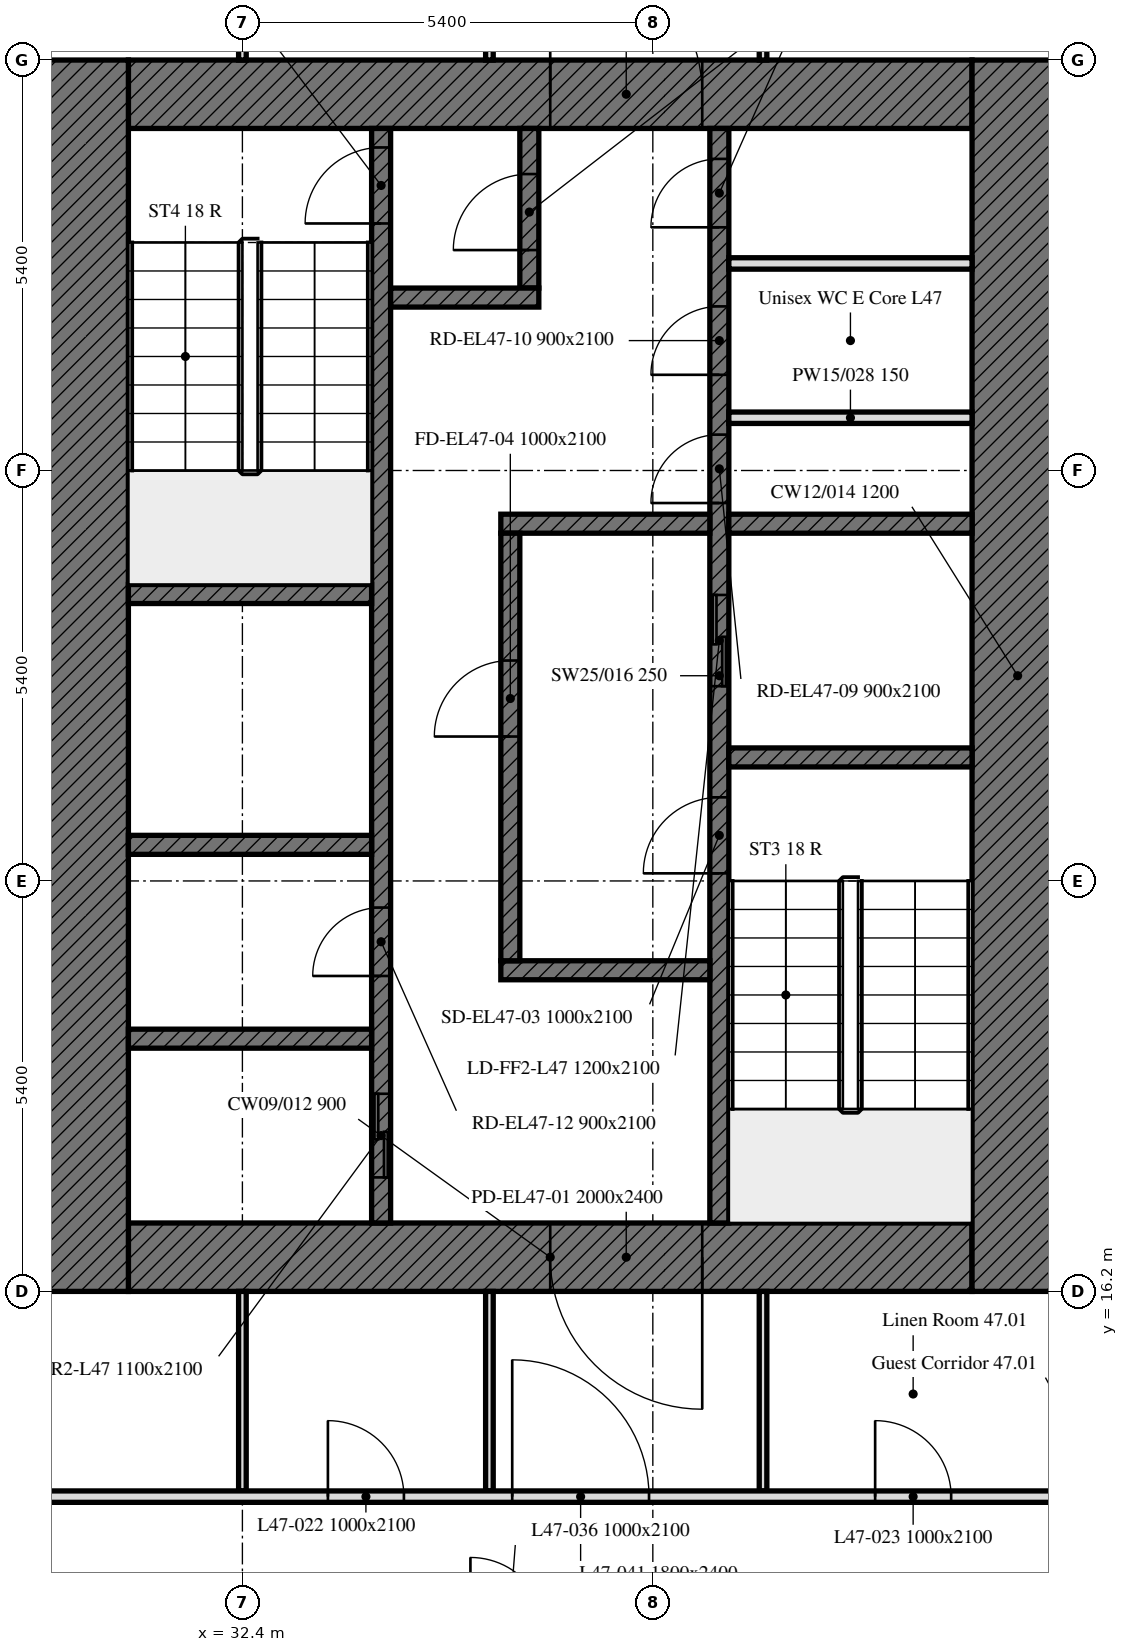
"""IFC4 building model, lengths in metres.
Left out: names, types, materials, properties, quantities, classifications, styles, units other than length and angle.
Written with IfcOpenShell. Run it as: python <this file> out.ifc"""

import sys

from ifc_helpers import new_model, si_unit, direction, frame, frame_2d, origin, place, context, subcontext, project, spatial, rectangle, extrude, element, fill, save


model = new_model("IFC4")
c1 = context("Model", 3, precision=1e-05, world=origin(), true_north=direction((0.0, 1.0)))
c2 = subcontext(c1, "Body", "Model", "MODEL_VIEW")
j1 = project(units=[si_unit("LENGTHUNIT", "METRE"), si_unit("PLANEANGLEUNIT", "RADIAN")], contexts=[c1])
p1 = place(None, origin())
s1 = spatial("IfcSite", under=j1, at=p1, CompositionType="ELEMENT")
p2 = place(p1, origin())
s2 = spatial("IfcBuilding", under=s1, at=p2, CompositionType="ELEMENT")
p3 = place(p2, frame((0.0, 0.0, 193.9)))
s3 = spatial("IfcBuildingStorey", under=s2, at=p3, CompositionType="ELEMENT", Elevation=193.9)
p4 = place(p3, frame((42.0, 16.65, 0.0), z_axis=(0.0, 0.0, 1.0), x_axis=(-1.0, 0.0, 0.0)))
e1 = element("IfcWall", 1, at=p4, inside=s3, PredefinedType="SOLIDWALL", context=c2, shape_type="SweptSolid", body=[
    extrude(rectangle(XDim=11.1, YDim=0.9, at=frame_2d((5.55, 0.0))), origin(), (0.0, 0.0, 1.0), 3.0),
])
p5 = place(p4, frame((3.55, 0.0, 0.0)))
e2 = element("IfcOpeningElement", 2, at=p5, cuts=e1, PredefinedType="OPENING", context=c2, shape_type="SweptSolid", body=[
    extrude(rectangle(XDim=2.0, YDim=2.4, at=frame_2d((1.0, 1.2))), frame((0.0, 0.45, 0.0), z_axis=(0.0, -1.0, 0.0), x_axis=(1.0, 0.0, 0.0)), (0.0, 0.0, 1.0), 0.9),
])
p6 = place(p3, frame((30.9, 31.95, 0.0), z_axis=(0.0, 0.0, 1.0), x_axis=(1.0, 0.0, 0.0)))
e3 = element("IfcWall", 3, at=p6, inside=s3, PredefinedType="SOLIDWALL", context=c2, shape_type="SweptSolid", body=[
    extrude(rectangle(XDim=11.1, YDim=0.9, at=frame_2d((5.55, 0.0))), origin(), (0.0, 0.0, 1.0), 3.0),
])
p7 = place(p6, frame((5.55, 0.0, 0.0)))
e4 = element("IfcOpeningElement", 4, at=p7, cuts=e3, PredefinedType="OPENING", context=c2, shape_type="SweptSolid", body=[
    extrude(rectangle(XDim=2.0, YDim=2.4, at=frame_2d((1.0, 1.2))), frame((0.0, 0.45, 0.0), z_axis=(0.0, -1.0, 0.0), x_axis=(1.0, 0.0, 0.0)), (0.0, 0.0, 1.0), 0.9),
])
for number, where, z_axis, x_axis in (
    (5, (42.6, 32.4, 0.0), (0.0, 0.0, 1.0), (0.0, -1.0, 0.0)),
    (6, (30.3, 16.2, 0.0), (0.0, 0.0, 1.0), (0.0, 1.0, 0.0)),
):
    element("IfcWall", number, at=place(p3, frame(where, z_axis=z_axis, x_axis=x_axis)), inside=s3, PredefinedType="SOLIDWALL", context=c2, shape_type="SweptSolid", body=[
        extrude(rectangle(XDim=16.2, YDim=1.2, at=frame_2d((8.1, 0.0))), origin(), (0.0, 0.0, 1.0), 3.0),
    ])
p8 = place(p3, frame((38.675, 17.1, 0.0), z_axis=(0.0, 0.0, 1.0), x_axis=(0.0, 1.0, 0.0)))
e7 = element("IfcWall", 7, at=p8, inside=s3, PredefinedType="SOLIDWALL", context=c2, shape_type="SweptSolid", body=[
    extrude(rectangle(XDim=14.4, YDim=0.25, at=frame_2d((7.2, 0.0))), origin(), (0.0, 0.0, 1.0), 3.0),
])
p9 = place(p8, frame((4.6, 0.0, 0.0)))
e8 = element("IfcOpeningElement", 8, at=p9, cuts=e7, PredefinedType="OPENING", context=c2, shape_type="SweptSolid", body=[
    extrude(rectangle(XDim=1.0, YDim=2.1, at=frame_2d((0.5, 1.05))), frame((0.0, 0.125, 0.0), z_axis=(0.0, -1.0, 0.0), x_axis=(1.0, 0.0, 0.0)), (0.0, 0.0, 1.0), 0.25),
])
p10 = place(p8, frame((7.062, 0.0, 0.0)))
e9 = element("IfcOpeningElement", 9, at=p10, cuts=e7, PredefinedType="OPENING", context=c2, shape_type="SweptSolid", body=[
    extrude(rectangle(XDim=1.2, YDim=2.1, at=frame_2d((0.6, 1.05))), frame((0.0, 0.125, 0.0), z_axis=(0.0, -1.0, 0.0), x_axis=(1.0, 0.0, 0.0)), (0.0, 0.0, 1.0), 0.25),
])
p11 = place(p8, frame((9.472, 0.0, 0.0)))
e10 = element("IfcOpeningElement", 10, at=p11, cuts=e7, PredefinedType="OPENING", context=c2, shape_type="SweptSolid", body=[
    extrude(rectangle(XDim=0.9, YDim=2.1, at=frame_2d((0.45, 1.05))), frame((0.0, 0.125, 0.0), z_axis=(0.0, -1.0, 0.0), x_axis=(1.0, 0.0, 0.0)), (0.0, 0.0, 1.0), 0.25),
])
p12 = place(p8, frame((11.159, 0.0, 0.0)))
e11 = element("IfcOpeningElement", 11, at=p12, cuts=e7, PredefinedType="OPENING", context=c2, shape_type="SweptSolid", body=[
    extrude(rectangle(XDim=0.9, YDim=2.1, at=frame_2d((0.45, 1.05))), frame((0.0, 0.125, 0.0), z_axis=(0.0, -1.0, 0.0), x_axis=(1.0, 0.0, 0.0)), (0.0, 0.0, 1.0), 0.25),
])
p13 = place(p8, frame((13.1, 0.0, 0.0)))
e12 = element("IfcOpeningElement", 12, at=p13, cuts=e7, PredefinedType="OPENING", context=c2, shape_type="SweptSolid", body=[
    extrude(rectangle(XDim=0.9, YDim=2.1, at=frame_2d((0.45, 1.05))), frame((0.0, 0.125, 0.0), z_axis=(0.0, -1.0, 0.0), x_axis=(1.0, 0.0, 0.0)), (0.0, 0.0, 1.0), 0.25),
])
p14 = place(p3, frame((34.225, 17.1, 0.0), z_axis=(0.0, 0.0, 1.0), x_axis=(0.0, 1.0, 0.0)))
e13 = element("IfcWall", 13, at=p14, inside=s3, PredefinedType="SOLIDWALL", context=c2, shape_type="SweptSolid", body=[
    extrude(rectangle(XDim=14.4, YDim=0.25, at=frame_2d((7.2, 0.0))), origin(), (0.0, 0.0, 1.0), 3.0),
])
p15 = place(p14, frame((13.15, 0.0, 0.0)))
e14 = element("IfcOpeningElement", 14, at=p15, cuts=e13, PredefinedType="OPENING", context=c2, shape_type="SweptSolid", body=[
    extrude(rectangle(XDim=1.0, YDim=2.1, at=frame_2d((0.5, 1.05))), frame((0.0, 0.125, 0.0), z_axis=(0.0, -1.0, 0.0), x_axis=(1.0, 0.0, 0.0)), (0.0, 0.0, 1.0), 0.25),
])
p16 = place(p14, frame((0.6, 0.0, 0.0)))
e15 = element("IfcOpeningElement", 15, at=p16, cuts=e13, PredefinedType="OPENING", context=c2, shape_type="SweptSolid", body=[
    extrude(rectangle(XDim=1.1, YDim=2.1, at=frame_2d((0.55, 1.05))), frame((0.0, 0.125, 0.0), z_axis=(0.0, -1.0, 0.0), x_axis=(1.0, 0.0, 0.0)), (0.0, 0.0, 1.0), 0.25),
])
p17 = place(p14, frame((3.25, 0.0, 0.0)))
e16 = element("IfcOpeningElement", 16, at=p17, cuts=e13, PredefinedType="OPENING", context=c2, shape_type="SweptSolid", body=[
    extrude(rectangle(XDim=0.9, YDim=2.1, at=frame_2d((0.45, 1.05))), frame((0.0, 0.125, 0.0), z_axis=(0.0, -1.0, 0.0), x_axis=(1.0, 0.0, 0.0)), (0.0, 0.0, 1.0), 0.25),
])
p18 = place(p3, frame((38.8, 23.225, 0.0), z_axis=(0.0, 0.0, 1.0), x_axis=(1.0, 0.0, 0.0)))
e17 = element("IfcWall", 17, at=p18, inside=s3, PredefinedType="SOLIDWALL", context=c2, shape_type="SweptSolid", body=[
    extrude(rectangle(XDim=3.2, YDim=0.25, at=frame_2d((1.6, 0.0))), origin(), (0.0, 0.0, 1.0), 3.0),
])
for number, where, z_axis, x_axis in (
    (18, (30.9, 25.375, 0.0), (0.0, 0.0, 1.0), (1.0, 0.0, 0.0)),
    (19, (30.9, 22.075, 0.0), (0.0, 0.0, 1.0), (1.0, 0.0, 0.0)),
):
    element("IfcWall", number, at=place(p3, frame(where, z_axis=z_axis, x_axis=x_axis)), inside=s3, PredefinedType="SOLIDWALL", context=c2, shape_type="SweptSolid", body=[
        extrude(rectangle(XDim=3.2, YDim=0.25, at=frame_2d((1.6, 0.0))), origin(), (0.0, 0.0, 1.0), 3.0),
    ])
p19 = place(p3, frame((38.8, 26.3, 0.0), z_axis=(0.0, 0.0, 1.0), x_axis=(1.0, 0.0, 0.0)))
e20 = element("IfcWall", 20, at=p19, inside=s3, PredefinedType="SOLIDWALL", context=c2, shape_type="SweptSolid", body=[
    extrude(rectangle(XDim=3.2, YDim=0.25, at=frame_2d((1.6, 0.0))), origin(), (0.0, 0.0, 1.0), 3.0),
])
for number, where, z_axis, x_axis in (
    (21, (35.8, 26.3, 0.0), (0.0, 0.0, 1.0), (1.0, 0.0, 0.0)),
    (22, (35.8, 20.425, 0.0), (0.0, 0.0, 1.0), (1.0, 0.0, 0.0)),
):
    element("IfcWall", number, at=place(p3, frame(where, z_axis=z_axis, x_axis=x_axis)), inside=s3, PredefinedType="SOLIDWALL", context=c2, shape_type="SweptSolid", body=[
        extrude(rectangle(XDim=2.75, YDim=0.25, at=frame_2d((1.375, 0.0))), origin(), (0.0, 0.0, 1.0), 3.0),
    ])
p20 = place(p3, frame((36.175, 29.4, 0.0), z_axis=(0.0, 0.0, 1.0), x_axis=(0.0, 1.0, 0.0)))
e23 = element("IfcWall", 23, at=p20, inside=s3, PredefinedType="SOLIDWALL", context=c2, shape_type="SweptSolid", body=[
    extrude(rectangle(XDim=2.1, YDim=0.25, at=frame_2d((1.05, 0.0))), origin(), (0.0, 0.0, 1.0), 3.0),
])
p21 = place(p20, frame((0.5, 0.0, 0.0)))
e24 = element("IfcOpeningElement", 24, at=p21, cuts=e23, PredefinedType="OPENING", context=c2, shape_type="SweptSolid", body=[
    extrude(rectangle(XDim=1.0, YDim=2.1, at=frame_2d((0.5, 1.05))), frame((0.0, 0.125, 0.0), z_axis=(0.0, -1.0, 0.0), x_axis=(1.0, 0.0, 0.0)), (0.0, 0.0, 1.0), 0.25),
])
p22 = place(p3, frame((34.35, 29.275, 0.0), z_axis=(0.0, 0.0, 1.0), x_axis=(1.0, 0.0, 0.0)))
e25 = element("IfcWall", 25, at=p22, inside=s3, PredefinedType="SOLIDWALL", context=c2, shape_type="SweptSolid", body=[
    extrude(rectangle(XDim=1.95, YDim=0.25, at=frame_2d((0.975, 0.0))), origin(), (0.0, 0.0, 1.0), 3.0),
])
p23 = place(p3, frame((35.925, 20.55, 0.0), z_axis=(0.0, 0.0, 1.0), x_axis=(0.0, 1.0, 0.0)))
e26 = element("IfcWall", 26, at=p23, inside=s3, PredefinedType="SOLIDWALL", context=c2, shape_type="SweptSolid", body=[
    extrude(rectangle(XDim=5.625, YDim=0.25, at=frame_2d((2.812, 0.0))), origin(), (0.0, 0.0, 1.0), 3.0),
])
p24 = place(p23, frame((2.95, 0.0, 0.0)))
e27 = element("IfcOpeningElement", 27, at=p24, cuts=e26, PredefinedType="OPENING", context=c2, shape_type="SweptSolid", body=[
    extrude(rectangle(XDim=1.0, YDim=2.1, at=frame_2d((0.5, 1.05))), frame((0.0, 0.125, 0.0), z_axis=(0.0, -1.0, 0.0), x_axis=(1.0, 0.0, 0.0)), (0.0, 0.0, 1.0), 0.25),
])
p25 = place(p3, frame((30.9, 19.525, 0.0), z_axis=(0.0, 0.0, 1.0), x_axis=(1.0, 0.0, 0.0)))
e28 = element("IfcWall", 28, at=p25, inside=s3, PredefinedType="SOLIDWALL", context=c2, shape_type="SweptSolid", body=[
    extrude(rectangle(XDim=3.2, YDim=0.25, at=frame_2d((1.6, 0.0))), origin(), (0.0, 0.0, 1.0), 3.0),
])
for number, where, z_axis, x_axis in (
    (29, (38.8, 27.694, 0.0), (0.0, 0.0, 1.0), (1.0, 0.0, 0.0)),
    (30, (38.8, 29.724, 0.0), (0.0, 0.0, 1.0), (1.0, 0.0, 0.0)),
):
    element("IfcWall", number, at=place(p3, frame(where, z_axis=z_axis, x_axis=x_axis)), inside=s3, PredefinedType="PARTITIONING", context=c2, shape_type="SweptSolid", body=[
        extrude(rectangle(XDim=3.2, YDim=0.15, at=frame_2d((1.6, 0.0))), origin(), (0.0, 0.0, 1.0), 3.0),
    ])
p26 = place(p3, frame((32.4, 32.4, 0.0), z_axis=(0.0, 0.0, 1.0), x_axis=(0.0, 1.0, 0.0)))
e31 = element("IfcWall", 31, at=p26, inside=s3, PredefinedType="PARTITIONING", context=c2, shape_type="SweptSolid", body=[
    extrude(rectangle(XDim=4.98, YDim=0.1, at=frame_2d((2.49, 0.0))), origin(), (0.0, 0.0, 1.0), 2.4),
])
for number, where, z_axis, x_axis in (
    (32, (35.65, 39.525, 0.0), (0.0, 0.0, 1.0), (0.0, -1.0, 0.0)),
    (33, (39.25, 32.4, 0.0), (0.0, 0.0, 1.0), (0.0, 1.0, 0.0)),
):
    element("IfcWall", number, at=place(p3, frame(where, z_axis=z_axis, x_axis=x_axis)), inside=s3, PredefinedType="PARTITIONING", context=c2, shape_type="SweptSolid", body=[
        extrude(rectangle(XDim=7.125, YDim=0.1, at=frame_2d((3.562, 0.0))), origin(), (0.0, 0.0, 1.0), 2.4),
    ])
for number, where, z_axis, x_axis in (
    (34, (32.4, 13.575, 0.0), (0.0, 0.0, 1.0), (0.0, 1.0, 0.0)),
    (35, (35.65, 16.2, 0.0), (0.0, 0.0, 1.0), (0.0, -1.0, 0.0)),
    (36, (39.25, 13.575, 0.0), (0.0, 0.0, 1.0), (0.0, 1.0, 0.0)),
):
    element("IfcWall", number, at=place(p3, frame(where, z_axis=z_axis, x_axis=x_axis)), inside=s3, PredefinedType="PARTITIONING", context=c2, shape_type="SweptSolid", body=[
        extrude(rectangle(XDim=2.625, YDim=0.1, at=frame_2d((1.312, 0.0))), origin(), (0.0, 0.0, 1.0), 3.0),
    ])
p27 = place(p3, frame((9.45, 13.5, 0.0), z_axis=(0.0, 0.0, 1.0), x_axis=(1.0, 0.0, 0.0)))
e37 = element("IfcWall", 37, at=p27, inside=s3, PredefinedType="PARTITIONING", context=c2, shape_type="SweptSolid", body=[
    extrude(rectangle(XDim=33.675, YDim=0.15, at=frame_2d((16.837, 0.0))), origin(), (0.0, 0.0, 1.0), 3.0),
])
p28 = place(p27, frame((8.95, 0.0, 0.0)))
e38 = element("IfcOpeningElement", 38, at=p28, cuts=e37, PredefinedType="OPENING", context=c2, shape_type="SweptSolid", body=[
    extrude(rectangle(XDim=1.0, YDim=2.1, at=frame_2d((0.5, 1.05))), frame((0.0, 0.075, 0.0), z_axis=(0.0, -1.0, 0.0), x_axis=(1.0, 0.0, 0.0)), (0.0, 0.0, 1.0), 0.15),
])
p29 = place(p27, frame((15.517, 0.0, 0.0)))
e39 = element("IfcOpeningElement", 39, at=p29, cuts=e37, PredefinedType="OPENING", context=c2, shape_type="SweptSolid", body=[
    extrude(rectangle(XDim=1.0, YDim=2.1, at=frame_2d((0.5, 1.05))), frame((0.0, 0.075, 0.0), z_axis=(0.0, -1.0, 0.0), x_axis=(1.0, 0.0, 0.0)), (0.0, 0.0, 1.0), 0.15),
])
p30 = place(p27, frame((24.075, 0.0, 0.0)))
e40 = element("IfcOpeningElement", 40, at=p30, cuts=e37, PredefinedType="OPENING", context=c2, shape_type="SweptSolid", body=[
    extrude(rectangle(XDim=1.0, YDim=2.1, at=frame_2d((0.5, 1.05))), frame((0.0, 0.075, 0.0), z_axis=(0.0, -1.0, 0.0), x_axis=(1.0, 0.0, 0.0)), (0.0, 0.0, 1.0), 0.15),
])
p31 = place(p27, frame((31.275, 0.0, 0.0)))
e41 = element("IfcOpeningElement", 41, at=p31, cuts=e37, PredefinedType="OPENING", context=c2, shape_type="SweptSolid", body=[
    extrude(rectangle(XDim=1.0, YDim=2.1, at=frame_2d((0.5, 1.05))), frame((0.0, 0.075, 0.0), z_axis=(0.0, -1.0, 0.0), x_axis=(1.0, 0.0, 0.0)), (0.0, 0.0, 1.0), 0.15),
])
p32 = place(p27, frame((4.625, 0.0, 0.0)))
e42 = element("IfcOpeningElement", 42, at=p32, cuts=e37, PredefinedType="OPENING", context=c2, shape_type="SweptSolid", body=[
    extrude(rectangle(XDim=1.0, YDim=2.1, at=frame_2d((0.5, 1.05))), frame((0.0, 0.075, 0.0), z_axis=(0.0, -1.0, 0.0), x_axis=(1.0, 0.0, 0.0)), (0.0, 0.0, 1.0), 0.15),
])
p33 = place(p27, frame((1.4, 0.0, 0.0)))
e43 = element("IfcOpeningElement", 43, at=p33, cuts=e37, PredefinedType="OPENING", context=c2, shape_type="SweptSolid", body=[
    extrude(rectangle(XDim=1.8, YDim=2.4, at=frame_2d((0.9, 1.2))), frame((0.0, 0.075, 0.0), z_axis=(0.0, -1.0, 0.0), x_axis=(1.0, 0.0, 0.0)), (0.0, 0.0, 1.0), 0.15),
])
p34 = place(p27, frame((26.5, 0.0, 0.0)))
e44 = element("IfcOpeningElement", 44, at=p34, cuts=e37, PredefinedType="OPENING", context=c2, shape_type="SweptSolid", body=[
    extrude(rectangle(XDim=1.8, YDim=2.4, at=frame_2d((0.9, 1.2))), frame((0.0, 0.075, 0.0), z_axis=(0.0, -1.0, 0.0), x_axis=(1.0, 0.0, 0.0)), (0.0, 0.0, 1.0), 0.15),
])
p35 = place(p5, origin())
e45 = element("IfcDoor", 45, at=p35, inside=s3, OperationType="DOUBLE_DOOR_SINGLE_SWING", PredefinedType="DOOR", context=c2, shape_type="SweptSolid", body=[
    extrude(rectangle(XDim=2.0, YDim=2.4, at=frame_2d((1.0, 1.2))), frame((0.0, 0.025, 0.0), z_axis=(0.0, -1.0, 0.0), x_axis=(1.0, 0.0, 0.0)), (0.0, 0.0, 1.0), 0.05),
])
fill(e2, e45)
p36 = place(p7, origin())
e46 = element("IfcDoor", 46, at=p36, inside=s3, OperationType="DOUBLE_DOOR_SINGLE_SWING", PredefinedType="DOOR", context=c2, shape_type="SweptSolid", body=[
    extrude(rectangle(XDim=2.0, YDim=2.4, at=frame_2d((1.0, 1.2))), frame((0.0, 0.025, 0.0), z_axis=(0.0, -1.0, 0.0), x_axis=(1.0, 0.0, 0.0)), (0.0, 0.0, 1.0), 0.05),
])
fill(e4, e46)
p37 = place(p9, origin())
e47 = element("IfcDoor", 47, at=p37, inside=s3, OperationType="SINGLE_SWING_LEFT", PredefinedType="DOOR", context=c2, shape_type="SweptSolid", body=[
    extrude(rectangle(XDim=1.0, YDim=2.1, at=frame_2d((0.5, 1.05))), frame((0.0, 0.025, 0.0), z_axis=(0.0, -1.0, 0.0), x_axis=(1.0, 0.0, 0.0)), (0.0, 0.0, 1.0), 0.05),
])
fill(e8, e47)
p38 = place(p24, origin())
e48 = element("IfcDoor", 48, at=p38, inside=s3, OperationType="SINGLE_SWING_LEFT", PredefinedType="DOOR", context=c2, shape_type="SweptSolid", body=[
    extrude(rectangle(XDim=1.0, YDim=2.1, at=frame_2d((0.5, 1.05))), frame((0.0, 0.025, 0.0), z_axis=(0.0, -1.0, 0.0), x_axis=(1.0, 0.0, 0.0)), (0.0, 0.0, 1.0), 0.05),
])
fill(e27, e48)
p39 = place(p15, origin())
e49 = element("IfcDoor", 49, at=p39, inside=s3, OperationType="SINGLE_SWING_LEFT", PredefinedType="DOOR", context=c2, shape_type="SweptSolid", body=[
    extrude(rectangle(XDim=1.0, YDim=2.1, at=frame_2d((0.5, 1.05))), frame((0.0, 0.025, 0.0), z_axis=(0.0, -1.0, 0.0), x_axis=(1.0, 0.0, 0.0)), (0.0, 0.0, 1.0), 0.05),
])
fill(e14, e49)
p40 = place(p21, origin())
e50 = element("IfcDoor", 50, at=p40, inside=s3, OperationType="SINGLE_SWING_LEFT", PredefinedType="DOOR", context=c2, shape_type="SweptSolid", body=[
    extrude(rectangle(XDim=1.0, YDim=2.1, at=frame_2d((0.5, 1.05))), frame((0.0, 0.025, 0.0), z_axis=(0.0, -1.0, 0.0), x_axis=(1.0, 0.0, 0.0)), (0.0, 0.0, 1.0), 0.05),
])
fill(e24, e50)
p41 = place(p10, origin())
e51 = element("IfcDoor", 51, at=p41, inside=s3, OperationType="DOUBLE_DOOR_SLIDING", PredefinedType="DOOR", context=c2, shape_type="SweptSolid", body=[
    extrude(rectangle(XDim=1.2, YDim=2.1, at=frame_2d((0.6, 1.05))), frame((0.0, 0.025, 0.0), z_axis=(0.0, -1.0, 0.0), x_axis=(1.0, 0.0, 0.0)), (0.0, 0.0, 1.0), 0.05),
])
fill(e9, e51)
p42 = place(p16, origin())
e52 = element("IfcDoor", 52, at=p42, inside=s3, OperationType="DOUBLE_DOOR_SLIDING", PredefinedType="DOOR", context=c2, shape_type="SweptSolid", body=[
    extrude(rectangle(XDim=1.1, YDim=2.1, at=frame_2d((0.55, 1.05))), frame((0.0, 0.025, 0.0), z_axis=(0.0, -1.0, 0.0), x_axis=(1.0, 0.0, 0.0)), (0.0, 0.0, 1.0), 0.05),
])
fill(e15, e52)
p43 = place(p11, origin())
e53 = element("IfcDoor", 53, at=p43, inside=s3, OperationType="SINGLE_SWING_LEFT", PredefinedType="DOOR", context=c2, shape_type="SweptSolid", body=[
    extrude(rectangle(XDim=0.9, YDim=2.1, at=frame_2d((0.45, 1.05))), frame((0.0, 0.025, 0.0), z_axis=(0.0, -1.0, 0.0), x_axis=(1.0, 0.0, 0.0)), (0.0, 0.0, 1.0), 0.05),
])
fill(e10, e53)
p44 = place(p12, origin())
e54 = element("IfcDoor", 54, at=p44, inside=s3, OperationType="SINGLE_SWING_LEFT", PredefinedType="DOOR", context=c2, shape_type="SweptSolid", body=[
    extrude(rectangle(XDim=0.9, YDim=2.1, at=frame_2d((0.45, 1.05))), frame((0.0, 0.025, 0.0), z_axis=(0.0, -1.0, 0.0), x_axis=(1.0, 0.0, 0.0)), (0.0, 0.0, 1.0), 0.05),
])
fill(e11, e54)
p45 = place(p13, origin())
e55 = element("IfcDoor", 55, at=p45, inside=s3, OperationType="SINGLE_SWING_LEFT", PredefinedType="DOOR", context=c2, shape_type="SweptSolid", body=[
    extrude(rectangle(XDim=0.9, YDim=2.1, at=frame_2d((0.45, 1.05))), frame((0.0, 0.025, 0.0), z_axis=(0.0, -1.0, 0.0), x_axis=(1.0, 0.0, 0.0)), (0.0, 0.0, 1.0), 0.05),
])
fill(e12, e55)
p46 = place(p17, origin())
e56 = element("IfcDoor", 56, at=p46, inside=s3, OperationType="SINGLE_SWING_LEFT", PredefinedType="DOOR", context=c2, shape_type="SweptSolid", body=[
    extrude(rectangle(XDim=0.9, YDim=2.1, at=frame_2d((0.45, 1.05))), frame((0.0, 0.025, 0.0), z_axis=(0.0, -1.0, 0.0), x_axis=(1.0, 0.0, 0.0)), (0.0, 0.0, 1.0), 0.05),
])
fill(e16, e56)
p47 = place(p30, origin())
e57 = element("IfcDoor", 57, at=p47, inside=s3, OperationType="SINGLE_SWING_LEFT", PredefinedType="DOOR", context=c2, shape_type="SweptSolid", body=[
    extrude(rectangle(XDim=1.0, YDim=2.1, at=frame_2d((0.5, 1.05))), frame((0.0, 0.025, 0.0), z_axis=(0.0, -1.0, 0.0), x_axis=(1.0, 0.0, 0.0)), (0.0, 0.0, 1.0), 0.05),
])
fill(e40, e57)
p48 = place(p31, origin())
e58 = element("IfcDoor", 58, at=p48, inside=s3, OperationType="SINGLE_SWING_RIGHT", PredefinedType="DOOR", context=c2, shape_type="SweptSolid", body=[
    extrude(rectangle(XDim=1.0, YDim=2.1, at=frame_2d((0.5, 1.05))), frame((0.0, 0.025, 0.0), z_axis=(0.0, -1.0, 0.0), x_axis=(1.0, 0.0, 0.0)), (0.0, 0.0, 1.0), 0.05),
])
fill(e41, e58)
p49 = place(p34, origin())
e59 = element("IfcDoor", 59, at=p49, inside=s3, OperationType="DOUBLE_DOOR_SINGLE_SWING", PredefinedType="DOOR", context=c2, shape_type="SweptSolid", body=[
    extrude(rectangle(XDim=1.8, YDim=2.4, at=frame_2d((0.9, 1.2))), frame((0.0, 0.025, 0.0), z_axis=(0.0, -1.0, 0.0), x_axis=(1.0, 0.0, 0.0)), (0.0, 0.0, 1.0), 0.05),
])
fill(e44, e59)
save(model, sys.argv[1])
